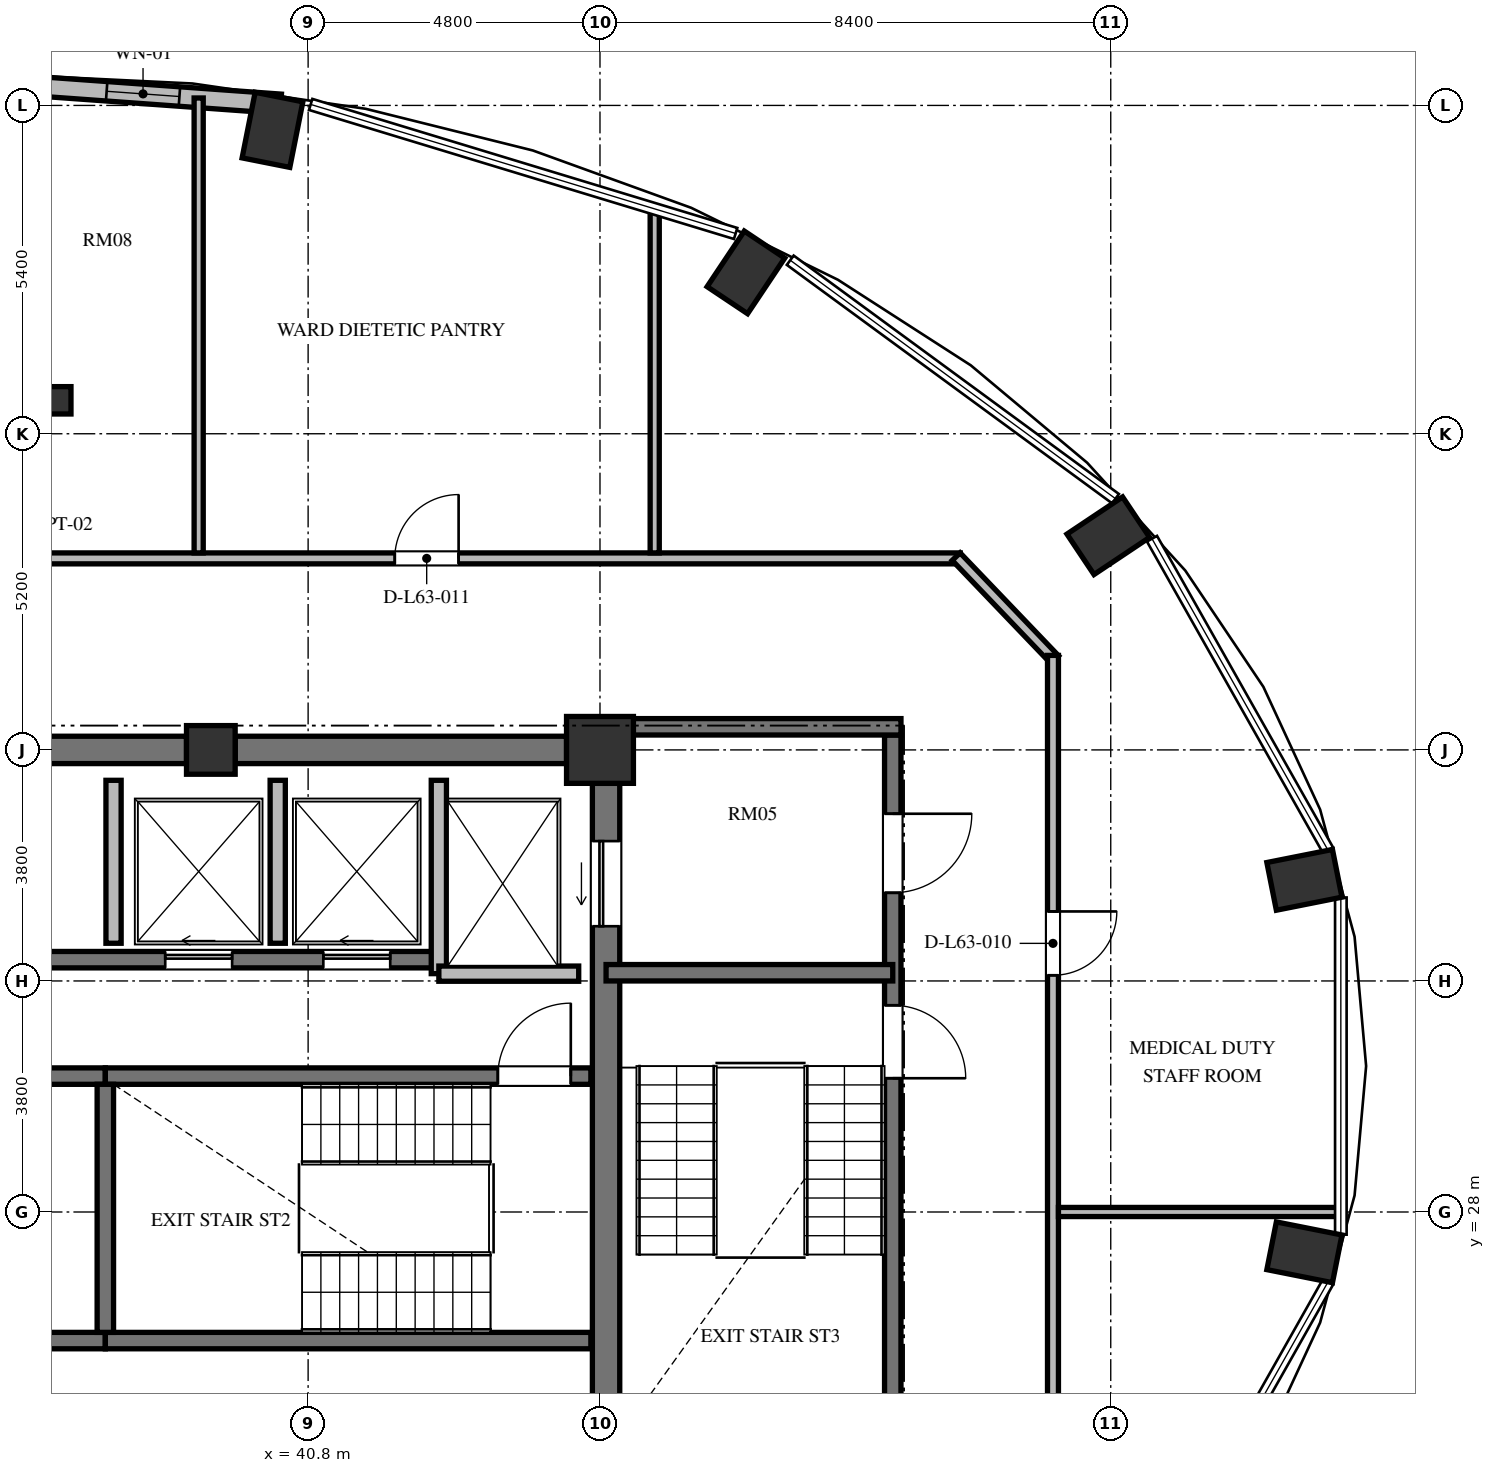
"""IFC4 building model, lengths in metres.
Left out: names, types, materials, properties, quantities, classifications, styles, units other than length and angle.
Written with IfcOpenShell. Run it as: python <this file> out.ifc"""

import sys

from ifc_helpers import new_model, si_unit, direction, frame, frame_2d, origin, origin_2d, place, context, subcontext, project, spatial, rectangle, extrude, element, fill, save


model = new_model("IFC4")
c1 = context("Model", 3, precision=1e-05, world=origin(), true_north=direction((0.0, 1.0)))
c2 = subcontext(c1, "Body", "Model", "MODEL_VIEW")
j1 = project(units=[si_unit("LENGTHUNIT", "METRE"), si_unit("PLANEANGLEUNIT", "RADIAN")], contexts=[c1])
p1 = place(None, origin())
s1 = spatial("IfcSite", under=j1, at=p1, CompositionType="ELEMENT")
p2 = place(p1, origin())
s2 = spatial("IfcBuilding", under=s1, at=p2, CompositionType="ELEMENT")
p3 = place(p2, frame((0.0, 0.0, 242.256)))
s3 = spatial("IfcBuildingStorey", under=s2, at=p3, CompositionType="ELEMENT", Elevation=242.256)
for number, where, z_axis, x_axis in (
    (1, (57.185, 27.337, 0.0), (0.0, 0.0, 1.0), (0.981, -0.195, 0.0)),
    (2, (57.185, 33.463, 0.0), (0.0, 0.0, 1.0), (0.981, 0.195, 0.0)),
    (3, (53.96, 39.123, 0.0), (0.0, 0.0, 1.0), (0.831, 0.556, 0.0)),
    (4, (48.0, 43.454, 0.0), (0.0, 0.0, 1.0), (0.556, 0.831, 0.0)),
    (5, (40.214, 45.798, 0.0), (0.0, 0.0, 1.0), (0.195, 0.981, 0.0)),
):
    element("IfcColumn", number, at=place(p3, frame(where, z_axis=z_axis, x_axis=x_axis)), inside=s3, PredefinedType="COLUMN", context=c2, shape_type="SweptSolid", body=[
        extrude(rectangle(XDim=1.1, YDim=0.8, at=origin_2d()), origin(), (0.0, 0.0, 1.0), 3.648),
    ])
p4 = place(p3, frame((45.6, 35.6, 0.0), z_axis=(0.0, 0.0, 1.0), x_axis=(1.0, 0.0, 0.0)))
e6 = element("IfcColumn", 6, at=p4, inside=s3, PredefinedType="COLUMN", context=c2, shape_type="SweptSolid", body=[
    extrude(rectangle(XDim=1.1, YDim=1.1, at=origin_2d()), origin(), (0.0, 0.0, 1.0), 3.648),
])
p5 = place(p3, frame((39.2, 35.6, 0.0), z_axis=(0.0, 0.0, 1.0), x_axis=(1.0, 0.0, 0.0)))
e7 = element("IfcColumn", 7, at=p5, inside=s3, PredefinedType="COLUMN", context=c2, shape_type="SweptSolid", body=[
    extrude(rectangle(XDim=0.8, YDim=0.8, at=origin_2d()), origin(), (0.0, 0.0, 1.0), 3.648),
])
p6 = place(p3, frame((36.6, 41.35, 0.0), z_axis=(0.0, 0.0, 1.0), x_axis=(1.0, 0.0, 0.0)))
e8 = element("IfcColumn", 8, at=p6, inside=s3, PredefinedType="PILASTER", context=c2, shape_type="SweptSolid", body=[
    extrude(rectangle(XDim=0.6, YDim=0.45, at=origin_2d()), origin(), (0.0, 0.0, 1.0), 3.648),
])
p7 = place(p3, frame((45.7, 20.95, 0.0), z_axis=(0.0, 0.0, 1.0), x_axis=(0.0, 1.0, 0.0)))
e9 = element("IfcWall", 9, at=p7, inside=s3, PredefinedType="SHEAR", context=c2, shape_type="SweptSolid", body=[
    extrude(rectangle(XDim=14.1, YDim=0.45, at=frame_2d((7.05, 0.0))), origin(), (0.0, 0.0, 1.0), 3.648),
])
p8 = place(p7, frame((11.75, 0.0, 0.0)))
e10 = element("IfcOpeningElement", 10, at=p8, cuts=e9, PredefinedType="OPENING", context=c2, shape_type="SweptSolid", body=[
    extrude(rectangle(XDim=1.4, YDim=2.3, at=frame_2d((0.7, 1.15))), frame((0.0, 0.235, 0.0), z_axis=(0.0, -1.0, 0.0), x_axis=(1.0, 0.0, 0.0)), (0.0, 0.0, 1.0), 0.47),
])
p9 = place(p7, frame((0.95, 0.0, 0.0)))
e11 = element("IfcOpeningElement", 11, at=p9, cuts=e9, PredefinedType="OPENING", context=c2, shape_type="SweptSolid", body=[
    extrude(rectangle(XDim=1.4, YDim=2.3, at=frame_2d((0.7, 1.15))), frame((0.0, 0.235, 0.0), z_axis=(0.0, -1.0, 0.0), x_axis=(1.0, 0.0, 0.0)), (0.0, 0.0, 1.0), 0.47),
])
p10 = place(p3, frame((33.2, 35.6, 0.0), z_axis=(0.0, 0.0, 1.0), x_axis=(1.0, 0.0, 0.0)))
e12 = element("IfcWall", 12, at=p10, inside=s3, PredefinedType="SHEAR", context=c2, shape_type="SweptSolid", body=[
    extrude(rectangle(XDim=5.6, YDim=0.45, at=frame_2d((2.8, 0.0))), origin(), (0.0, 0.0, 1.0), 3.648),
])
p11 = place(p3, frame((39.6, 35.6, 0.0), z_axis=(0.0, 0.0, 1.0), x_axis=(1.0, 0.0, 0.0)))
e13 = element("IfcWall", 13, at=p11, inside=s3, PredefinedType="SHEAR", context=c2, shape_type="SweptSolid", body=[
    extrude(rectangle(XDim=5.45, YDim=0.45, at=frame_2d((2.725, 0.0))), origin(), (0.0, 0.0, 1.0), 3.648),
])
p12 = place(p3, frame((40.35, 46.226, 0.0), z_axis=(0.0, 0.0, 1.0), x_axis=(-0.997409061056, 0.071938619141, 0.0)))
e14 = element("IfcWall", 14, at=p12, inside=s3, PredefinedType="SOLIDWALL", context=c2, shape_type="SweptSolid", body=[
    extrude(rectangle(XDim=4.541, YDim=0.32, at=frame_2d((2.271, 0.0))), origin(), (0.0, 0.0, 1.0), 3.198),
])
p13 = place(p12, frame((1.67, 0.0, 0.85)))
e15 = element("IfcOpeningElement", 15, at=p13, cuts=e14, PredefinedType="OPENING", context=c2, shape_type="SweptSolid", body=[
    extrude(rectangle(XDim=1.2, YDim=2.2, at=frame_2d((0.6, 1.1))), frame((0.0, 0.17, 0.0), z_axis=(0.0, -1.0, 0.0), x_axis=(1.0, 0.0, 0.0)), (0.0, 0.0, 1.0), 0.34),
])
p14 = place(p3, frame((34.535, 30.235, 0.0), z_axis=(0.0, 0.0, 1.0), x_axis=(1.0, 0.0, 0.0)))
e16 = element("IfcWall", 16, at=p14, inside=s3, PredefinedType="SHEAR", context=c2, shape_type="SweptSolid", body=[
    extrude(rectangle(XDim=2.93, YDim=0.27, at=frame_2d((1.465, 0.0))), origin(), (0.0, 0.0, 1.0), 3.648),
])
p15 = place(p14, frame((0.965, 0.0, 0.0)))
e17 = element("IfcOpeningElement", 17, at=p15, cuts=e16, PredefinedType="OPENING", context=c2, shape_type="SweptSolid", body=[
    extrude(rectangle(XDim=1.0, YDim=2.1, at=frame_2d((0.5, 1.05))), frame((0.0, 0.145, 0.0), z_axis=(0.0, -1.0, 0.0), x_axis=(1.0, 0.0, 0.0)), (0.0, 0.0, 1.0), 0.29),
])
p16 = place(p3, frame((37.465, 30.235, 0.0), z_axis=(0.0, 0.0, 1.0), x_axis=(1.0, 0.0, 0.0)))
e18 = element("IfcWall", 18, at=p16, inside=s3, PredefinedType="SHEAR", context=c2, shape_type="SweptSolid", body=[
    extrude(rectangle(XDim=7.985, YDim=0.27, at=frame_2d((3.992, 0.0))), origin(), (0.0, 0.0, 1.0), 3.648),
])
p17 = place(p16, frame((6.455, 0.0, 0.0)))
e19 = element("IfcOpeningElement", 19, at=p17, cuts=e18, PredefinedType="OPENING", context=c2, shape_type="SweptSolid", body=[
    extrude(rectangle(XDim=1.2, YDim=2.15, at=frame_2d((0.6, 1.075))), frame((0.0, 0.145, 0.0), z_axis=(0.0, -1.0, 0.0), x_axis=(1.0, 0.0, 0.0)), (0.0, 0.0, 1.0), 0.29),
])
p18 = place(p3, frame((34.535, 25.885, 0.0), z_axis=(0.0, 0.0, 1.0), x_axis=(1.0, 0.0, 0.0)))
e20 = element("IfcWall", 20, at=p18, inside=s3, PredefinedType="SHEAR", context=c2, shape_type="SweptSolid", body=[
    extrude(rectangle(XDim=2.93, YDim=0.27, at=frame_2d((1.465, 0.0))), origin(), (0.0, 0.0, 1.0), 3.648),
])
p19 = place(p3, frame((37.465, 25.885, 0.0), z_axis=(0.0, 0.0, 1.0), x_axis=(1.0, 0.0, 0.0)))
e21 = element("IfcWall", 21, at=p19, inside=s3, PredefinedType="SHEAR", context=c2, shape_type="SweptSolid", body=[
    extrude(rectangle(XDim=7.985, YDim=0.27, at=frame_2d((3.992, 0.0))), origin(), (0.0, 0.0, 1.0), 3.648),
])
p20 = place(p3, frame((37.465, 26.02, 0.0), z_axis=(0.0, 0.0, 1.0), x_axis=(0.0, 1.0, 0.0)))
e22 = element("IfcWall", 22, at=p20, inside=s3, PredefinedType="SHEAR", context=c2, shape_type="SweptSolid", body=[
    extrude(rectangle(XDim=4.08, YDim=0.27, at=frame_2d((2.04, 0.0))), origin(), (0.0, 0.0, 1.0), 3.648),
])
p21 = place(p3, frame((26.55, 32.15, 0.0), z_axis=(0.0, 0.0, 1.0), x_axis=(1.0, 0.0, 0.0)))
e23 = element("IfcWall", 23, at=p21, inside=s3, PredefinedType="SHEAR", context=c2, shape_type="SweptSolid", body=[
    extrude(rectangle(XDim=16.4, YDim=0.27, at=frame_2d((8.2, 0.0))), origin(), (0.0, 0.0, 1.0), 3.648),
])
p22 = place(p21, frame((5.125, 0.0, 0.0)))
e24 = element("IfcOpeningElement", 24, at=p22, cuts=e23, PredefinedType="OPENING", context=c2, shape_type="SweptSolid", body=[
    extrude(rectangle(XDim=1.05, YDim=2.15, at=frame_2d((0.525, 1.075))), frame((0.0, 0.145, 0.0), z_axis=(0.0, -1.0, 0.0), x_axis=(1.0, 0.0, 0.0)), (0.0, 0.0, 1.0), 0.29),
])
p23 = place(p21, frame((11.9, 0.0, 0.0)))
e25 = element("IfcOpeningElement", 25, at=p23, cuts=e23, PredefinedType="OPENING", context=c2, shape_type="SweptSolid", body=[
    extrude(rectangle(XDim=1.1, YDim=2.2, at=frame_2d((0.55, 1.1))), frame((0.0, 0.145, 0.0), z_axis=(0.0, -1.0, 0.0), x_axis=(1.0, 0.0, 0.0)), (0.0, 0.0, 1.0), 0.29),
])
p24 = place(p21, frame((14.5, 0.0, 0.0)))
e26 = element("IfcOpeningElement", 26, at=p24, cuts=e23, PredefinedType="OPENING", context=c2, shape_type="SweptSolid", body=[
    extrude(rectangle(XDim=1.1, YDim=2.2, at=frame_2d((0.55, 1.1))), frame((0.0, 0.145, 0.0), z_axis=(0.0, -1.0, 0.0), x_axis=(1.0, 0.0, 0.0)), (0.0, 0.0, 1.0), 0.29),
])
p25 = place(p3, frame((42.95, 31.92, 0.0), z_axis=(0.0, 0.0, 1.0), x_axis=(0.0, 1.0, 0.0)))
e27 = element("IfcWall", 27, at=p25, inside=s3, PredefinedType="SOLIDWALL", context=c2, shape_type="SweptSolid", body=[
    extrude(rectangle(XDim=3.18, YDim=0.25, at=frame_2d((1.59, 0.0))), origin(), (0.0, 0.0, 1.0), 3.198),
])
p26 = place(p3, frame((42.95, 31.92, 0.0), z_axis=(0.0, 0.0, 1.0), x_axis=(1.0, 0.0, 0.0)))
e28 = element("IfcWall", 28, at=p26, inside=s3, PredefinedType="SOLIDWALL", context=c2, shape_type="SweptSolid", body=[
    extrude(rectangle(XDim=2.3, YDim=0.25, at=frame_2d((1.15, 0.0))), origin(), (0.0, 0.0, 1.0), 3.198),
])
for number, where, z_axis, x_axis in (
    (29, (37.6, 32.42, 0.0), (0.0, 0.0, 1.0), (0.0, 1.0, 0.0)),
    (30, (40.3, 32.42, 0.0), (0.0, 0.0, 1.0), (0.0, 1.0, 0.0)),
):
    element("IfcWall", number, at=place(p3, frame(where, z_axis=z_axis, x_axis=x_axis)), inside=s3, PredefinedType="SOLIDWALL", context=c2, shape_type="SweptSolid", body=[
        extrude(rectangle(XDim=2.68, YDim=0.25, at=frame_2d((1.34, 0.0))), origin(), (0.0, 0.0, 1.0), 3.198),
    ])
p27 = place(p3, frame((50.415, 35.845, 0.0), z_axis=(0.0, 0.0, 1.0), x_axis=(0.0, -1.0, 0.0)))
e31 = element("IfcWall", 31, at=p27, inside=s3, PredefinedType="SHEAR", context=c2, shape_type="SweptSolid", body=[
    extrude(rectangle(XDim=15.825, YDim=0.27, at=frame_2d((7.913, 0.0))), origin(), (0.0, 0.0, 1.0), 3.648),
])
p28 = place(p27, frame((4.445, 0.0, 0.0)))
e32 = element("IfcOpeningElement", 32, at=p28, cuts=e31, PredefinedType="OPENING", context=c2, shape_type="SweptSolid", body=[
    extrude(rectangle(XDim=1.2, YDim=2.15, at=frame_2d((0.6, 1.075))), frame((0.0, 0.145, 0.0), z_axis=(0.0, -1.0, 0.0), x_axis=(1.0, 0.0, 0.0)), (0.0, 0.0, 1.0), 0.29),
])
p29 = place(p27, frame((1.295, 0.0, 0.0)))
e33 = element("IfcOpeningElement", 33, at=p29, cuts=e31, PredefinedType="OPENING", context=c2, shape_type="SweptSolid", body=[
    extrude(rectangle(XDim=1.3, YDim=2.2, at=frame_2d((0.65, 1.1))), frame((0.0, 0.145, 0.0), z_axis=(0.0, -1.0, 0.0), x_axis=(1.0, 0.0, 0.0)), (0.0, 0.0, 1.0), 0.29),
])
p30 = place(p27, frame((13.095, 0.0, 0.0)))
e34 = element("IfcOpeningElement", 34, at=p30, cuts=e31, PredefinedType="OPENING", context=c2, shape_type="SweptSolid", body=[
    extrude(rectangle(XDim=1.3, YDim=2.2, at=frame_2d((0.65, 1.1))), frame((0.0, 0.145, 0.0), z_axis=(0.0, -1.0, 0.0), x_axis=(1.0, 0.0, 0.0)), (0.0, 0.0, 1.0), 0.29),
])
p31 = place(p3, frame((45.925, 35.98, 0.0), z_axis=(0.0, 0.0, 1.0), x_axis=(1.0, 0.0, 0.0)))
e35 = element("IfcWall", 35, at=p31, inside=s3, PredefinedType="SHEAR", context=c2, shape_type="SweptSolid", body=[
    extrude(rectangle(XDim=4.625, YDim=0.27, at=frame_2d((2.312, 0.0))), origin(), (0.0, 0.0, 1.0), 3.648),
])
p32 = place(p3, frame((45.7, 31.935, 0.0), z_axis=(0.0, 0.0, 1.0), x_axis=(1.0, 0.0, 0.0)))
e36 = element("IfcWall", 36, at=p32, inside=s3, PredefinedType="SHEAR", context=c2, shape_type="SweptSolid", body=[
    extrude(rectangle(XDim=4.715, YDim=0.27, at=frame_2d((2.357, 0.0))), origin(), (0.0, 0.0, 1.0), 3.648),
])
p33 = place(p3, frame((30.71, 38.75, 0.0), z_axis=(0.0, 0.0, 1.0), x_axis=(1.0, 0.0, 0.0)))
e37 = element("IfcWall", 37, at=p33, inside=s3, PredefinedType="PARTITIONING", context=c2, shape_type="SweptSolid", body=[
    extrude(rectangle(XDim=20.815, YDim=0.18, at=frame_2d((10.408, 0.0))), origin(), (0.0, 0.0, 1.0), 2.823),
])
p34 = place(p33, frame((11.515, 0.0, 0.0)))
e38 = element("IfcOpeningElement", 38, at=p34, cuts=e37, PredefinedType="OPENING", context=c2, shape_type="SweptSolid", body=[
    extrude(rectangle(XDim=1.05, YDim=2.15, at=frame_2d((0.525, 1.075))), frame((0.0, 0.1, 0.0), z_axis=(0.0, -1.0, 0.0), x_axis=(1.0, 0.0, 0.0)), (0.0, 0.0, 1.0), 0.2),
])
p35 = place(p33, frame((4.379, 0.0, 0.0)))
e39 = element("IfcOpeningElement", 39, at=p35, cuts=e37, PredefinedType="OPENING", context=c2, shape_type="SweptSolid", body=[
    extrude(rectangle(XDim=1.05, YDim=2.15, at=frame_2d((0.525, 1.075))), frame((0.0, 0.1, 0.0), z_axis=(0.0, -1.0, 0.0), x_axis=(1.0, 0.0, 0.0)), (0.0, 0.0, 1.0), 0.2),
])
p36 = place(p3, frame((51.458, 38.779, 0.0), z_axis=(0.0, 0.0, 1.0), x_axis=(0.691359830363, -0.722510612352, 0.0)))
e40 = element("IfcWall", 40, at=p36, inside=s3, PredefinedType="PARTITIONING", context=c2, shape_type="SweptSolid", body=[
    extrude(rectangle(XDim=2.343, YDim=0.18, at=frame_2d((1.172, 0.0))), origin(), (0.0, 0.0, 1.0), 2.783),
])
p37 = place(p3, frame((53.05, 37.155, 0.0), z_axis=(0.0, 0.0, 1.0), x_axis=(0.0, -1.0, 0.0)))
e41 = element("IfcWall", 41, at=p37, inside=s3, PredefinedType="PARTITIONING", context=c2, shape_type="SweptSolid", body=[
    extrude(rectangle(XDim=13.509, YDim=0.18, at=frame_2d((6.754, 0.0))), origin(), (0.0, 0.0, 1.0), 3.198),
])
p38 = place(p37, frame((4.211, 0.0, 0.0)))
e42 = element("IfcOpeningElement", 42, at=p38, cuts=e41, PredefinedType="OPENING", context=c2, shape_type="SweptSolid", body=[
    extrude(rectangle(XDim=1.05, YDim=2.15, at=frame_2d((0.525, 1.075))), frame((0.0, 0.1, 0.0), z_axis=(0.0, -1.0, 0.0), x_axis=(1.0, 0.0, 0.0)), (0.0, 0.0, 1.0), 0.2),
])
p39 = place(p3, frame((53.14, 28.0, 0.0), z_axis=(0.0, 0.0, 1.0), x_axis=(1.0, 0.0, 0.0)))
e43 = element("IfcWall", 43, at=p39, inside=s3, PredefinedType="PARTITIONING", context=c2, shape_type="SweptSolid", body=[
    extrude(rectangle(XDim=4.632, YDim=0.15, at=frame_2d((2.316, 0.0))), origin(), (0.0, 0.0, 1.0), 3.198),
])
p40 = place(p3, frame((39.0, 38.84, 0.0), z_axis=(0.0, 0.0, 1.0), x_axis=(0.0, 1.0, 0.0)))
e44 = element("IfcWall", 44, at=p40, inside=s3, PredefinedType="PARTITIONING", context=c2, shape_type="SweptSolid", body=[
    extrude(rectangle(XDim=7.482, YDim=0.15, at=frame_2d((3.741, 0.0))), origin(), (0.0, 0.0, 1.0), 3.198),
])
p41 = place(p3, frame((46.5, 38.84, 0.0), z_axis=(0.0, 0.0, 1.0), x_axis=(0.0, 1.0, 0.0)))
e45 = element("IfcWall", 45, at=p41, inside=s3, PredefinedType="PARTITIONING", context=c2, shape_type="SweptSolid", body=[
    extrude(rectangle(XDim=5.641, YDim=0.15, at=frame_2d((2.821, 0.0))), origin(), (0.0, 0.0, 1.0), 3.198),
])
p42 = place(p13, origin())
e46 = element("IfcWindow", 46, at=p42, inside=s3, PartitioningType="SINGLE_PANEL", PredefinedType="WINDOW", context=c2, shape_type="SweptSolid", body=[
    extrude(rectangle(XDim=1.2, YDim=2.2, at=frame_2d((0.6, 1.1))), frame((0.0, 0.03, 0.0), z_axis=(0.0, -1.0, 0.0), x_axis=(1.0, 0.0, 0.0)), (0.0, 0.0, 1.0), 0.06),
])
fill(e15, e46)
p43 = place(p17, origin())
e47 = element("IfcDoor", 47, at=p43, inside=s3, OperationType="SINGLE_SWING_RIGHT", PredefinedType="DOOR", context=c2, shape_type="SweptSolid", body=[
    extrude(rectangle(XDim=1.2, YDim=2.15, at=frame_2d((0.6, 1.075))), frame((0.0, 0.025, 0.0), z_axis=(0.0, -1.0, 0.0), x_axis=(1.0, 0.0, 0.0)), (0.0, 0.0, 1.0), 0.05),
])
fill(e19, e47)
p44 = place(p23, origin())
e48 = element("IfcDoor", 48, at=p44, inside=s3, OperationType="SLIDING_TO_LEFT", PredefinedType="DOOR", context=c2, shape_type="SweptSolid", body=[
    extrude(rectangle(XDim=1.1, YDim=2.2, at=frame_2d((0.55, 1.1))), frame((0.0, 0.025, 0.0), z_axis=(0.0, -1.0, 0.0), x_axis=(1.0, 0.0, 0.0)), (0.0, 0.0, 1.0), 0.05),
])
fill(e25, e48)
p45 = place(p24, origin())
e49 = element("IfcDoor", 49, at=p45, inside=s3, OperationType="SLIDING_TO_LEFT", PredefinedType="DOOR", context=c2, shape_type="SweptSolid", body=[
    extrude(rectangle(XDim=1.1, YDim=2.2, at=frame_2d((0.55, 1.1))), frame((0.0, 0.025, 0.0), z_axis=(0.0, -1.0, 0.0), x_axis=(1.0, 0.0, 0.0)), (0.0, 0.0, 1.0), 0.05),
])
fill(e26, e49)
p46 = place(p8, origin())
e50 = element("IfcDoor", 50, at=p46, inside=s3, OperationType="SLIDING_TO_LEFT", PredefinedType="DOOR", context=c2, shape_type="SweptSolid", body=[
    extrude(rectangle(XDim=1.4, YDim=2.3, at=frame_2d((0.7, 1.15))), frame((0.0, 0.025, 0.0), z_axis=(0.0, -1.0, 0.0), x_axis=(1.0, 0.0, 0.0)), (0.0, 0.0, 1.0), 0.05),
])
fill(e10, e50)
p47 = place(p28, origin())
e51 = element("IfcDoor", 51, at=p47, inside=s3, OperationType="SINGLE_SWING_RIGHT", PredefinedType="DOOR", context=c2, shape_type="SweptSolid", body=[
    extrude(rectangle(XDim=1.2, YDim=2.15, at=frame_2d((0.6, 1.075))), frame((0.0, 0.025, 0.0), z_axis=(0.0, -1.0, 0.0), x_axis=(1.0, 0.0, 0.0)), (0.0, 0.0, 1.0), 0.05),
])
fill(e32, e51)
p48 = place(p29, origin())
e52 = element("IfcDoor", 52, at=p48, inside=s3, OperationType="SINGLE_SWING_LEFT", PredefinedType="DOOR", context=c2, shape_type="SweptSolid", body=[
    extrude(rectangle(XDim=1.3, YDim=2.2, at=frame_2d((0.65, 1.1))), frame((0.0, 0.025, 0.0), z_axis=(0.0, -1.0, 0.0), x_axis=(1.0, 0.0, 0.0)), (0.0, 0.0, 1.0), 0.05),
])
fill(e33, e52)
p49 = place(p38, origin())
e53 = element("IfcDoor", 53, at=p49, inside=s3, OperationType="SINGLE_SWING_LEFT", PredefinedType="DOOR", context=c2, shape_type="SweptSolid", body=[
    extrude(rectangle(XDim=1.05, YDim=2.15, at=frame_2d((0.525, 1.075))), frame((0.0, 0.025, 0.0), z_axis=(0.0, -1.0, 0.0), x_axis=(1.0, 0.0, 0.0)), (0.0, 0.0, 1.0), 0.05),
])
fill(e42, e53)
p50 = place(p34, origin())
e54 = element("IfcDoor", 54, at=p50, inside=s3, OperationType="SINGLE_SWING_RIGHT", PredefinedType="DOOR", context=c2, shape_type="SweptSolid", body=[
    extrude(rectangle(XDim=1.05, YDim=2.15, at=frame_2d((0.525, 1.075))), frame((0.0, 0.025, 0.0), z_axis=(0.0, -1.0, 0.0), x_axis=(1.0, 0.0, 0.0)), (0.0, 0.0, 1.0), 0.05),
])
fill(e38, e54)
save(model, sys.argv[1])
